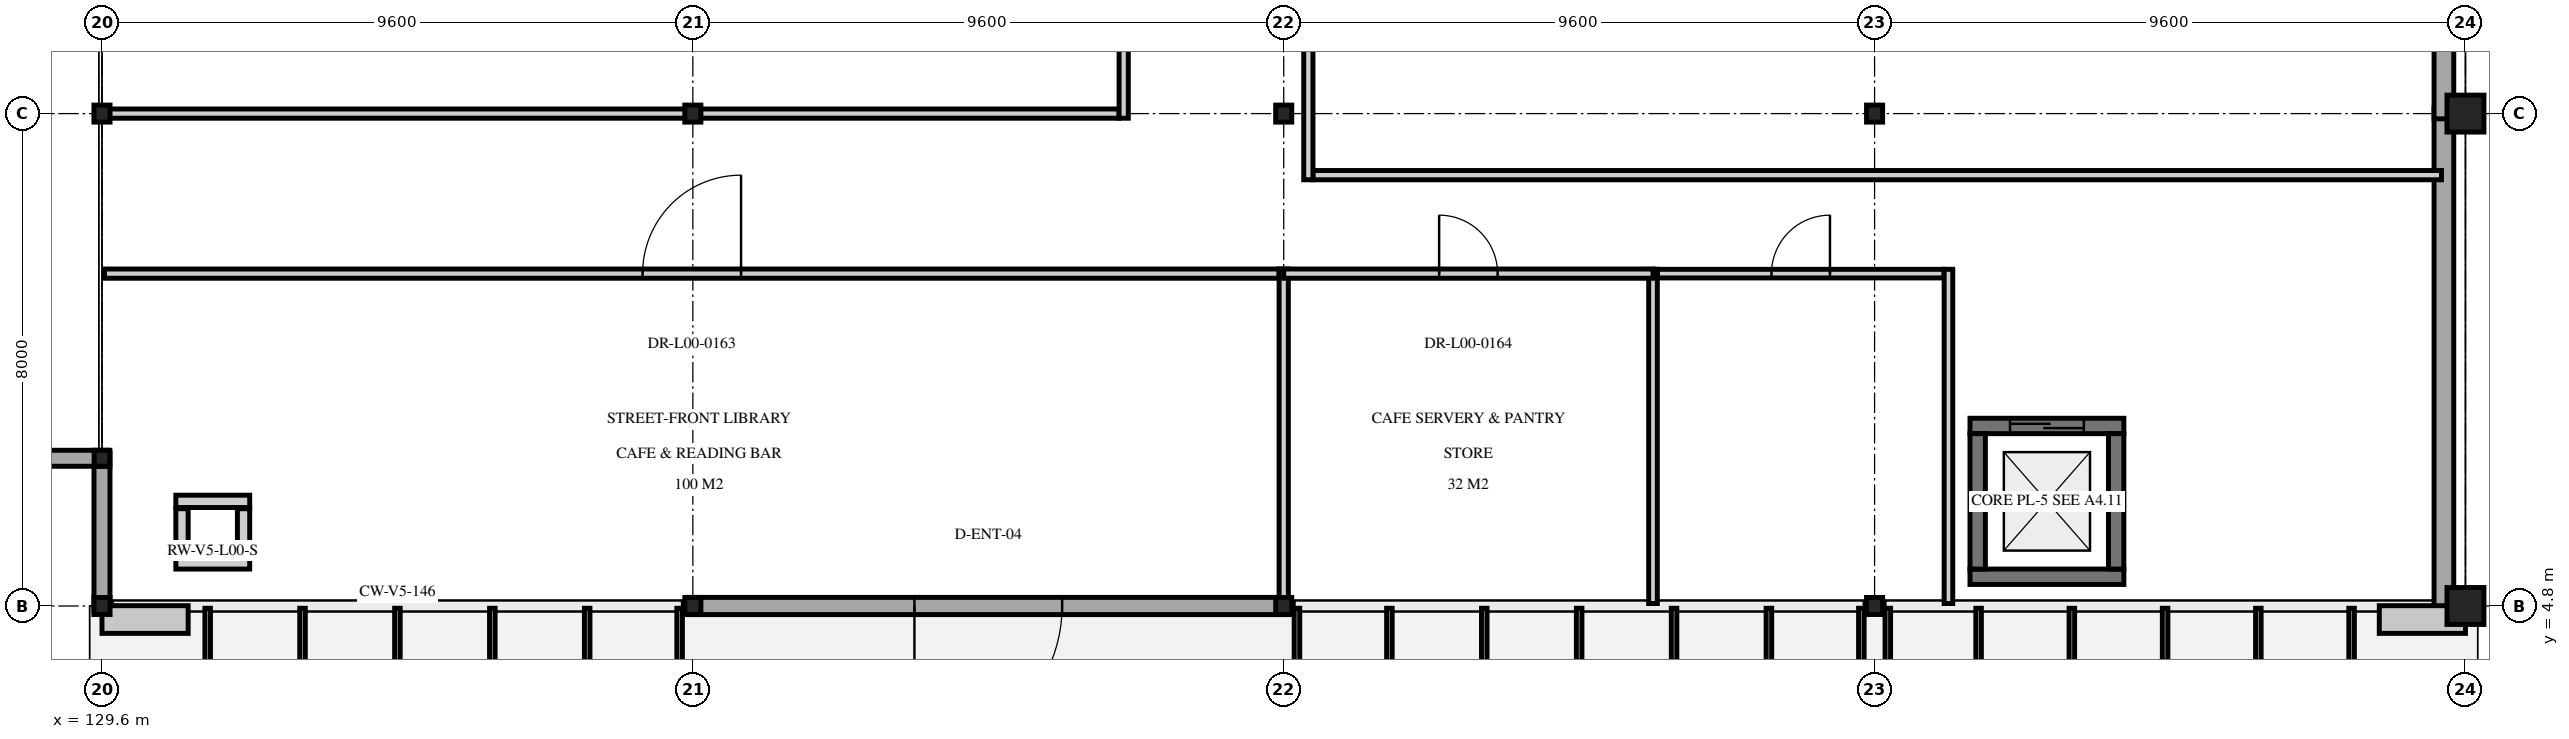
"""IFC4 building model, lengths in metres.
Left out: names, types, materials, properties, quantities, classifications, styles, units other than length and angle.
Written with IfcOpenShell. Run it as: python <this file> out.ifc"""

import sys

from ifc_helpers import new_model, si_unit, direction, frame, frame_2d, origin, origin_2d, place, context, subcontext, project, spatial, rectangle, i_section, extrude, element, fill, save


model = new_model("IFC4")
c1 = context("Model", 3, precision=1e-05, world=origin(), true_north=direction((0.0, 1.0)))
c2 = subcontext(c1, "Body", "Model", "MODEL_VIEW")
j1 = project(units=[si_unit("LENGTHUNIT", "METRE"), si_unit("PLANEANGLEUNIT", "RADIAN")], contexts=[c1])
p1 = place(None, origin())
s1 = spatial("IfcSite", under=j1, at=p1, CompositionType="ELEMENT")
p2 = place(p1, origin())
s2 = spatial("IfcBuilding", under=s1, at=p2, CompositionType="ELEMENT")
p3 = place(p2, origin())
s3 = spatial("IfcBuildingStorey", under=s2, at=p3, CompositionType="ELEMENT", Elevation=0.0)
for number, where, z_axis, x_axis in (
    (1, (129.6, 4.8, 0.0), (0.0, 0.0, 1.0), (1.0, 0.0, 0.0)),
    (2, (129.6, 12.8, 0.0), (0.0, 0.0, 1.0), (1.0, 0.0, 0.0)),
    (3, (139.2, 4.8, 0.0), (0.0, 0.0, 1.0), (1.0, 0.0, 0.0)),
    (4, (139.2, 12.8, 0.0), (0.0, 0.0, 1.0), (1.0, 0.0, 0.0)),
    (5, (148.8, 4.8, 0.0), (0.0, 0.0, 1.0), (1.0, 0.0, 0.0)),
    (6, (148.8, 12.8, 0.0), (0.0, 0.0, 1.0), (1.0, 0.0, 0.0)),
    (7, (158.4, 4.8, 0.0), (0.0, 0.0, 1.0), (1.0, 0.0, 0.0)),
    (8, (158.4, 12.8, 0.0), (0.0, 0.0, 1.0), (1.0, 0.0, 0.0)),
):
    element("IfcColumn", number, at=place(p3, frame(where, z_axis=z_axis, x_axis=x_axis)), inside=s3, PredefinedType="COLUMN", context=c2, shape_type="SweptSolid", body=[
        extrude(i_section(OverallWidth=0.261, OverallDepth=0.276, WebThickness=0.015, FlangeThickness=0.025, at=origin_2d()), origin(), (0.0, 0.0, 1.0), 5.1),
    ])
for number, where, z_axis, x_axis in (
    (9, (168.0, 4.8, 0.0), (0.0, 0.0, 1.0), (1.0, 0.0, 0.0)),
    (10, (168.0, 12.8, 0.0), (0.0, 0.0, 1.0), (1.0, 0.0, 0.0)),
):
    element("IfcColumn", number, at=place(p3, frame(where, z_axis=z_axis, x_axis=x_axis)), inside=s3, PredefinedType="COLUMN", context=c2, shape_type="SweptSolid", body=[
        extrude(rectangle(XDim=0.6, YDim=0.6, at=origin_2d()), origin(), (0.0, 0.0, 1.0), 5.1),
    ])
p4 = place(p3, frame((129.6, 7.2, 0.0), z_axis=(0.0, 0.0, 1.0), x_axis=(1.0, 0.0, 0.0)))
e11 = element("IfcColumn", 11, at=p4, inside=s3, PredefinedType="COLUMN", context=c2, shape_type="SweptSolid", body=[
    extrude(i_section(OverallWidth=0.256, OverallDepth=0.26, WebThickness=0.01, FlangeThickness=0.017, at=origin_2d()), origin(), (0.0, 0.0, 1.0), 5.1),
])
p5 = place(p3, frame((162.45, 5.275, 0.0), z_axis=(0.0, 0.0, 1.0), x_axis=(-1.0, 0.0, 0.0)))
e12 = element("IfcWall", 12, at=p5, inside=s3, PredefinedType="SHEAR", context=c2, shape_type="SweptSolid", body=[
    extrude(rectangle(XDim=2.5, YDim=0.25, at=frame_2d((1.25, 0.0))), origin(), (0.0, 0.0, 1.0), 4.88),
])
p6 = place(p3, frame((159.95, 7.725, 0.0), z_axis=(0.0, 0.0, 1.0), x_axis=(1.0, 0.0, 0.0)))
e13 = element("IfcWall", 13, at=p6, inside=s3, PredefinedType="SHEAR", context=c2, shape_type="SweptSolid", body=[
    extrude(rectangle(XDim=2.5, YDim=0.25, at=frame_2d((1.25, 0.0))), origin(), (0.0, 0.0, 1.0), 4.88),
])
p7 = place(p6, frame((0.65, 0.0, 0.0)))
e14 = element("IfcOpeningElement", 14, at=p7, cuts=e13, PredefinedType="OPENING", context=c2, shape_type="SweptSolid", body=[
    extrude(rectangle(XDim=1.2, YDim=2.2, at=frame_2d((0.6, 1.1))), frame((0.0, 0.135, 0.0), z_axis=(0.0, -1.0, 0.0), x_axis=(1.0, 0.0, 0.0)), (0.0, 0.0, 1.0), 0.27),
])
for number, where, z_axis, x_axis in (
    (15, (160.075, 5.4, 0.0), (0.0, 0.0, 1.0), (0.0, 1.0, 0.0)),
    (16, (162.325, 7.6, 0.0), (0.0, 0.0, 1.0), (0.0, -1.0, 0.0)),
):
    element("IfcWall", number, at=place(p3, frame(where, z_axis=z_axis, x_axis=x_axis)), inside=s3, PredefinedType="SHEAR", context=c2, shape_type="SweptSolid", body=[
        extrude(rectangle(XDim=2.2, YDim=0.25, at=frame_2d((1.1, 0.0))), origin(), (0.0, 0.0, 1.0), 4.88),
    ])
for number, where, z_axis, x_axis in (
    (17, (132.0, 5.5, 0.0), (0.0, 0.0, 1.0), (-1.0, 0.0, 0.0)),
    (18, (130.8, 6.5, 0.0), (0.0, 0.0, 1.0), (1.0, 0.0, 0.0)),
):
    element("IfcWall", number, at=place(p3, frame(where, z_axis=z_axis, x_axis=x_axis)), inside=s3, PredefinedType="PARTITIONING", context=c2, shape_type="SweptSolid", body=[
        extrude(rectangle(XDim=1.2, YDim=0.2, at=frame_2d((0.6, 0.0))), origin(), (0.0, 0.0, 1.0), 4.38),
    ])
for number, where, z_axis, x_axis in (
    (19, (130.9, 5.62, 0.0), (0.0, 0.0, 1.0), (0.0, 1.0, 0.0)),
    (20, (131.9, 6.38, 0.0), (0.0, 0.0, 1.0), (0.0, -1.0, 0.0)),
):
    element("IfcWall", number, at=place(p3, frame(where, z_axis=z_axis, x_axis=x_axis)), inside=s3, PredefinedType="PARTITIONING", context=c2, shape_type="SweptSolid", body=[
        extrude(rectangle(XDim=0.76, YDim=0.2, at=frame_2d((0.38, 0.0))), origin(), (0.0, 0.0, 1.0), 4.38),
    ])
p8 = place(p3, frame((148.885, 4.8, 0.0), z_axis=(0.0, 0.0, 1.0), x_axis=(-1.0, 0.0, 0.0)))
e21 = element("IfcWall", 21, at=p8, inside=s3, PredefinedType="SOLIDWALL", context=c2, shape_type="SweptSolid", body=[
    extrude(rectangle(XDim=9.77, YDim=0.28, at=frame_2d((4.885, 0.0))), origin(), (0.0, 0.0, 1.0), 3.805),
])
p9 = place(p8, frame((3.685, 0.0, 0.0)))
e22 = element("IfcOpeningElement", 22, at=p9, cuts=e21, PredefinedType="OPENING", context=c2, shape_type="SweptSolid", body=[
    extrude(rectangle(XDim=2.4, YDim=2.6, at=frame_2d((1.2, 1.3))), frame((0.0, 0.15, 0.0), z_axis=(0.0, -1.0, 0.0), x_axis=(1.0, 0.0, 0.0)), (0.0, 0.0, 1.0), 0.3),
])
for number, where, z_axis, x_axis in (
    (23, (167.65, 12.885, 0.0), (0.0, 0.0, 1.0), (0.0, -1.0, 0.0)),
    (24, (167.65, 20.885, 0.0), (0.0, 0.0, 1.0), (0.0, -1.0, 0.0)),
):
    element("IfcWall", number, at=place(p3, frame(where, z_axis=z_axis, x_axis=x_axis)), inside=s3, PredefinedType="SOLIDWALL", context=c2, shape_type="SweptSolid", body=[
        extrude(rectangle(XDim=8.17, YDim=0.32, at=frame_2d((4.085, 0.0))), origin(), (0.0, 0.0, 1.0), 4.442),
    ])
p10 = place(p3, frame((129.6, 4.715, 0.0), z_axis=(0.0, 0.0, 1.0), x_axis=(0.0, 1.0, 0.0)))
e25 = element("IfcWall", 25, at=p10, inside=s3, PredefinedType="SOLIDWALL", context=c2, shape_type="SweptSolid", body=[
    extrude(rectangle(XDim=2.57, YDim=0.26, at=frame_2d((1.285, 0.0))), origin(), (0.0, 0.0, 1.0), 4.442),
])
p11 = place(p3, frame((129.685, 7.2, 0.0), z_axis=(0.0, 0.0, 1.0), x_axis=(-1.0, 0.0, 0.0)))
e26 = element("IfcWall", 26, at=p11, inside=s3, PredefinedType="SOLIDWALL", context=c2, shape_type="SweptSolid", body=[
    extrude(rectangle(XDim=4.97, YDim=0.26, at=frame_2d((2.485, 0.0))), origin(), (0.0, 0.0, 1.0), 4.405),
])
p12 = place(p11, frame((1.585, 0.0, 0.0)))
e27 = element("IfcOpeningElement", 27, at=p12, cuts=e26, PredefinedType="OPENING", context=c2, shape_type="SweptSolid", body=[
    extrude(rectangle(XDim=1.8, YDim=2.4, at=frame_2d((0.9, 1.2))), frame((0.0, 0.14, 0.0), z_axis=(0.0, -1.0, 0.0), x_axis=(1.0, 0.0, 0.0)), (0.0, 0.0, 1.0), 0.28),
])
p13 = place(p3, frame((154.87, 10.2, 0.0), z_axis=(0.0, 0.0, 1.0), x_axis=(1.0, 0.0, 0.0)))
e28 = element("IfcWall", 28, at=p13, inside=s3, PredefinedType="PARTITIONING", context=c2, shape_type="SweptSolid", body=[
    extrude(rectangle(XDim=4.66, YDim=0.14, at=frame_2d((2.33, 0.0))), origin(), (0.0, 0.0, 1.0), 4.442),
])
p14 = place(p13, frame((1.855, 0.0, 0.0)))
e29 = element("IfcOpeningElement", 29, at=p14, cuts=e28, PredefinedType="OPENING", context=c2, shape_type="SweptSolid", body=[
    extrude(rectangle(XDim=0.95, YDim=2.1, at=frame_2d((0.475, 1.05))), frame((0.0, 0.08, 0.0), z_axis=(0.0, -1.0, 0.0), x_axis=(1.0, 0.0, 0.0)), (0.0, 0.0, 1.0), 0.16),
])
for number, where, z_axis, x_axis in (
    (30, (154.8, 4.84, 0.0), (0.0, 0.0, 1.0), (0.0, 1.0, 0.0)),
    (31, (159.6, 4.84, 0.0), (0.0, 0.0, 1.0), (0.0, 1.0, 0.0)),
):
    element("IfcWall", number, at=place(p3, frame(where, z_axis=z_axis, x_axis=x_axis)), inside=s3, PredefinedType="PARTITIONING", context=c2, shape_type="SweptSolid", body=[
        extrude(rectangle(XDim=5.43, YDim=0.14, at=frame_2d((2.715, 0.0))), origin(), (0.0, 0.0, 1.0), 4.505),
    ])
p15 = place(p3, frame((129.64, 10.2, 0.0), z_axis=(0.0, 0.0, 1.0), x_axis=(1.0, 0.0, 0.0)))
e32 = element("IfcWall", 32, at=p15, inside=s3, PredefinedType="PARTITIONING", context=c2, shape_type="SweptSolid", body=[
    extrude(rectangle(XDim=19.085, YDim=0.15, at=frame_2d((9.542, 0.0))), origin(), (0.0, 0.0, 1.0), 4.442),
])
p16 = place(p15, frame((8.743, 0.0, 0.0)))
e33 = element("IfcOpeningElement", 33, at=p16, cuts=e32, PredefinedType="OPENING", context=c2, shape_type="SweptSolid", body=[
    extrude(rectangle(XDim=1.6, YDim=2.25, at=frame_2d((0.8, 1.125))), frame((0.0, 0.085, 0.0), z_axis=(0.0, -1.0, 0.0), x_axis=(1.0, 0.0, 0.0)), (0.0, 0.0, 1.0), 0.17),
])
p17 = place(p3, frame((148.8, 4.84, 0.0), z_axis=(0.0, 0.0, 1.0), x_axis=(0.0, 1.0, 0.0)))
e34 = element("IfcWall", 34, at=p17, inside=s3, PredefinedType="PARTITIONING", context=c2, shape_type="SweptSolid", body=[
    extrude(rectangle(XDim=5.435, YDim=0.15, at=frame_2d((2.717, 0.0))), origin(), (0.0, 0.0, 1.0), 3.805),
])
p18 = place(p3, frame((148.8, 10.2, 0.0), z_axis=(0.0, 0.0, 1.0), x_axis=(1.0, 0.0, 0.0)))
e35 = element("IfcWall", 35, at=p18, inside=s3, PredefinedType="PARTITIONING", context=c2, shape_type="SweptSolid", body=[
    extrude(rectangle(XDim=6.0, YDim=0.15, at=frame_2d((3.0, 0.0))), origin(), (0.0, 0.0, 1.0), 4.442),
])
p19 = place(p18, frame((2.525, 0.0, 0.0)))
e36 = element("IfcOpeningElement", 36, at=p19, cuts=e35, PredefinedType="OPENING", context=c2, shape_type="SweptSolid", body=[
    extrude(rectangle(XDim=0.95, YDim=2.15, at=frame_2d((0.475, 1.075))), frame((0.0, 0.085, 0.0), z_axis=(0.0, -1.0, 0.0), x_axis=(1.0, 0.0, 0.0)), (0.0, 0.0, 1.0), 0.17),
])
p20 = place(p3, frame((129.64, 12.8, 0.0), z_axis=(0.0, 0.0, 1.0), x_axis=(1.0, 0.0, 0.0)))
e37 = element("IfcWall", 37, at=p20, inside=s3, PredefinedType="PARTITIONING", context=c2, shape_type="SweptSolid", body=[
    extrude(rectangle(XDim=16.485, YDim=0.15, at=frame_2d((8.243, 0.0))), origin(), (0.0, 0.0, 1.0), 4.442),
])
p21 = place(p3, frame((146.2, 12.725, 0.0), z_axis=(0.0, 0.0, 1.0), x_axis=(0.0, 1.0, 0.0)))
e38 = element("IfcWall", 38, at=p21, inside=s3, PredefinedType="PARTITIONING", context=c2, shape_type="SweptSolid", body=[
    extrude(rectangle(XDim=17.75, YDim=0.15, at=frame_2d((8.875, 0.0))), origin(), (0.0, 0.0, 1.0), 4.505),
])
p22 = place(p21, frame((8.075, 0.0, 0.0)))
e39 = element("IfcOpeningElement", 39, at=p22, cuts=e38, PredefinedType="OPENING", context=c2, shape_type="SweptSolid", body=[
    extrude(rectangle(XDim=1.6, YDim=2.25, at=frame_2d((0.8, 1.125))), frame((0.0, 0.085, 0.0), z_axis=(0.0, -1.0, 0.0), x_axis=(1.0, 0.0, 0.0)), (0.0, 0.0, 1.0), 0.17),
])
p23 = place(p3, frame((149.275, 11.8, 0.0), z_axis=(0.0, 0.0, 1.0), x_axis=(1.0, 0.0, 0.0)))
e40 = element("IfcWall", 40, at=p23, inside=s3, PredefinedType="PARTITIONING", context=c2, shape_type="SweptSolid", body=[
    extrude(rectangle(XDim=18.335, YDim=0.15, at=frame_2d((9.167, 0.0))), origin(), (0.0, 0.0, 1.0), 4.442),
])
p24 = place(p3, frame((149.2, 11.725, 0.0), z_axis=(0.0, 0.0, 1.0), x_axis=(0.0, 1.0, 0.0)))
e41 = element("IfcWall", 41, at=p24, inside=s3, PredefinedType="PARTITIONING", context=c2, shape_type="SweptSolid", body=[
    extrude(rectangle(XDim=18.75, YDim=0.15, at=frame_2d((9.375, 0.0))), origin(), (0.0, 0.0, 1.0), 4.505),
])
p25 = place(p24, frame((10.325, 0.0, 0.0)))
e42 = element("IfcOpeningElement", 42, at=p25, cuts=e41, PredefinedType="OPENING", context=c2, shape_type="SweptSolid", body=[
    extrude(rectangle(XDim=1.6, YDim=2.25, at=frame_2d((0.8, 1.125))), frame((0.0, 0.085, 0.0), z_axis=(0.0, -1.0, 0.0), x_axis=(1.0, 0.0, 0.0)), (0.0, 0.0, 1.0), 0.17),
])
p26 = place(p7, origin())
e43 = element("IfcDoor", 43, at=p26, inside=s3, OperationType="DOUBLE_DOOR_SLIDING", PredefinedType="DOOR", context=c2, shape_type="SweptSolid", body=[
    extrude(rectangle(XDim=1.2, YDim=2.2, at=frame_2d((0.6, 1.1))), frame((0.0, 0.025, 0.0), z_axis=(0.0, -1.0, 0.0), x_axis=(1.0, 0.0, 0.0)), (0.0, 0.0, 1.0), 0.05),
])
fill(e14, e43)
p27 = place(p9, origin())
e44 = element("IfcDoor", 44, at=p27, inside=s3, OperationType="DOUBLE_SWING_RIGHT", PredefinedType="DOOR", context=c2, shape_type="SweptSolid", body=[
    extrude(rectangle(XDim=2.4, YDim=2.6, at=frame_2d((1.2, 1.3))), frame((0.0, 0.025, 0.0), z_axis=(0.0, -1.0, 0.0), x_axis=(1.0, 0.0, 0.0)), (0.0, 0.0, 1.0), 0.05),
])
fill(e22, e44)
p28 = place(p14, origin())
e45 = element("IfcDoor", 45, at=p28, inside=s3, OperationType="SINGLE_SWING_RIGHT", PredefinedType="DOOR", context=c2, shape_type="SweptSolid", body=[
    extrude(rectangle(XDim=0.95, YDim=2.1, at=frame_2d((0.475, 1.05))), frame((0.0, 0.025, 0.0), z_axis=(0.0, -1.0, 0.0), x_axis=(1.0, 0.0, 0.0)), (0.0, 0.0, 1.0), 0.05),
])
fill(e29, e45)
p29 = place(p16, origin())
e46 = element("IfcDoor", 46, at=p29, inside=s3, OperationType="DOUBLE_DOOR_SINGLE_SWING", PredefinedType="DOOR", context=c2, shape_type="SweptSolid", body=[
    extrude(rectangle(XDim=1.6, YDim=2.25, at=frame_2d((0.8, 1.125))), frame((0.0, 0.025, 0.0), z_axis=(0.0, -1.0, 0.0), x_axis=(1.0, 0.0, 0.0)), (0.0, 0.0, 1.0), 0.05),
])
fill(e33, e46)
p30 = place(p19, origin())
e47 = element("IfcDoor", 47, at=p30, inside=s3, OperationType="SINGLE_SWING_LEFT", PredefinedType="DOOR", context=c2, shape_type="SweptSolid", body=[
    extrude(rectangle(XDim=0.95, YDim=2.15, at=frame_2d((0.475, 1.075))), frame((0.0, 0.025, 0.0), z_axis=(0.0, -1.0, 0.0), x_axis=(1.0, 0.0, 0.0)), (0.0, 0.0, 1.0), 0.05),
])
fill(e36, e47)
save(model, sys.argv[1])
